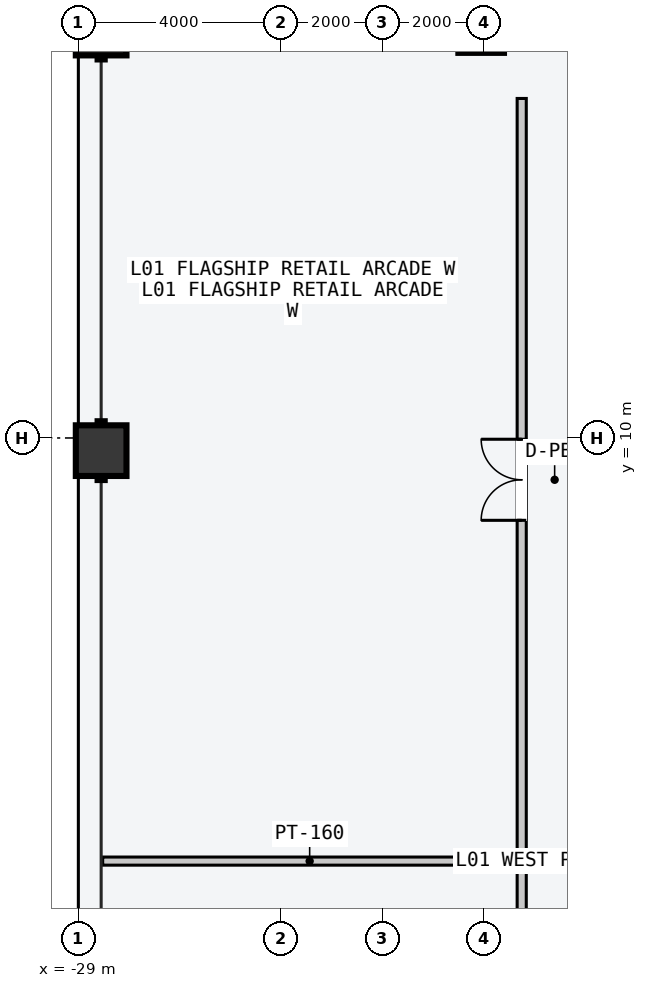
"""IFC4 building model, lengths in metres.
Left out: names, types, materials, properties, quantities, classifications, styles, units other than length and angle.
Written with IfcOpenShell. Run it as: python <this file> out.ifc"""

import sys

from ifc_helpers import new_model, si_unit, direction, frame, frame_2d, origin, origin_2d, place, context, subcontext, project, spatial, rectangle, hollow_rectangle, extrude, element, fill, save


model = new_model("IFC4")
c1 = context("Model", 3, precision=1e-05, world=origin(), true_north=direction((0.0, 1.0)))
c2 = subcontext(c1, "Body", "Model", "MODEL_VIEW")
j1 = project(units=[si_unit("LENGTHUNIT", "METRE"), si_unit("PLANEANGLEUNIT", "RADIAN")], contexts=[c1])
p1 = place(None, origin())
s1 = spatial("IfcSite", under=j1, at=p1, CompositionType="ELEMENT")
p2 = place(p1, origin())
s2 = spatial("IfcBuilding", under=s1, at=p2, CompositionType="ELEMENT")
p3 = place(p2, frame((0.0, 0.0, 4.8)))
s3 = spatial("IfcBuildingStorey", under=s2, at=p3, CompositionType="ELEMENT", Elevation=4.8)
p4 = place(p3, frame((-21.05, 18.05, 0.0), z_axis=(0.0, 0.0, 1.0), x_axis=(1.0, 0.0, 0.0)))
e1 = element("IfcColumn", 1, at=p4, inside=s3, PredefinedType="COLUMN", context=c2, shape_type="SweptSolid", body=[
    extrude(hollow_rectangle(XDim=0.9, YDim=0.9, WallThickness=0.045, at=origin_2d()), origin(), (0.0, 0.0, 1.0), 4.8),
])
for number, where, z_axis, x_axis in (
    (2, (-28.55, 9.75, 0.0), (0.0, 0.0, 1.0), (0.0, 1.0, 0.0)),
    (3, (-28.55, 18.05, 0.0), (0.0, 0.0, 1.0), (0.0, 1.0, 0.0)),
):
    element("IfcColumn", number, at=place(p3, frame(where, z_axis=z_axis, x_axis=x_axis)), inside=s3, PredefinedType="COLUMN", context=c2, shape_type="SweptSolid", body=[
        extrude(hollow_rectangle(XDim=1.0, YDim=1.0, WallThickness=0.05, at=origin_2d()), origin(), (0.0, 0.0, 1.0), 4.8),
    ])
p5 = place(p3, frame((-20.35, 1.65, 0.0), z_axis=(0.0, 0.0, 1.0), x_axis=(-1.0, 0.0, 0.0)))
e4 = element("IfcWall", 4, at=p5, inside=s3, PredefinedType="PARTITIONING", context=c2, shape_type="SweptSolid", body=[
    extrude(rectangle(XDim=8.17, YDim=0.16, at=frame_2d((4.085, 0.0))), origin(), (0.0, 0.0, 1.0), 4.58),
])
p6 = place(p3, frame((-20.25, -20.6, 0.0), z_axis=(0.0, 0.0, 1.0), x_axis=(0.0, 1.0, 0.0)))
e5 = element("IfcWall", 5, at=p6, inside=s3, PredefinedType="PARTITIONING", context=c2, shape_type="SweptSolid", body=[
    extrude(rectangle(XDim=37.3, YDim=0.18, at=frame_2d((18.65, 0.0))), origin(), (0.0, 0.0, 1.0), 4.58),
])
p7 = place(p6, frame((13.925, 0.0, 0.0)))
e6 = element("IfcOpeningElement", 6, at=p7, cuts=e5, PredefinedType="OPENING", context=c2, shape_type="SweptSolid", body=[
    extrude(rectangle(XDim=1.6, YDim=2.3, at=frame_2d((0.8, 1.15))), frame((0.0, 0.1, 0.0), z_axis=(0.0, -1.0, 0.0), x_axis=(1.0, 0.0, 0.0)), (0.0, 0.0, 1.0), 0.2),
])
p8 = place(p6, frame((28.975, 0.0, 0.0)))
e7 = element("IfcOpeningElement", 7, at=p8, cuts=e5, PredefinedType="OPENING", context=c2, shape_type="SweptSolid", body=[
    extrude(rectangle(XDim=1.6, YDim=2.3, at=frame_2d((0.8, 1.15))), frame((0.0, 0.1, 0.0), z_axis=(0.0, -1.0, 0.0), x_axis=(1.0, 0.0, 0.0)), (0.0, 0.0, 1.0), 0.2),
])
p9 = place(p8, origin())
e8 = element("IfcDoor", 8, at=p9, inside=s3, OperationType="DOUBLE_DOOR_SINGLE_SWING", PredefinedType="DOOR", context=c2, shape_type="SweptSolid", body=[
    extrude(rectangle(XDim=1.6, YDim=2.3, at=frame_2d((0.8, 1.15))), frame((0.0, 0.025, 0.0), z_axis=(0.0, -1.0, 0.0), x_axis=(1.0, 0.0, 0.0)), (0.0, 0.0, 1.0), 0.05),
])
fill(e7, e8)
save(model, sys.argv[1])
